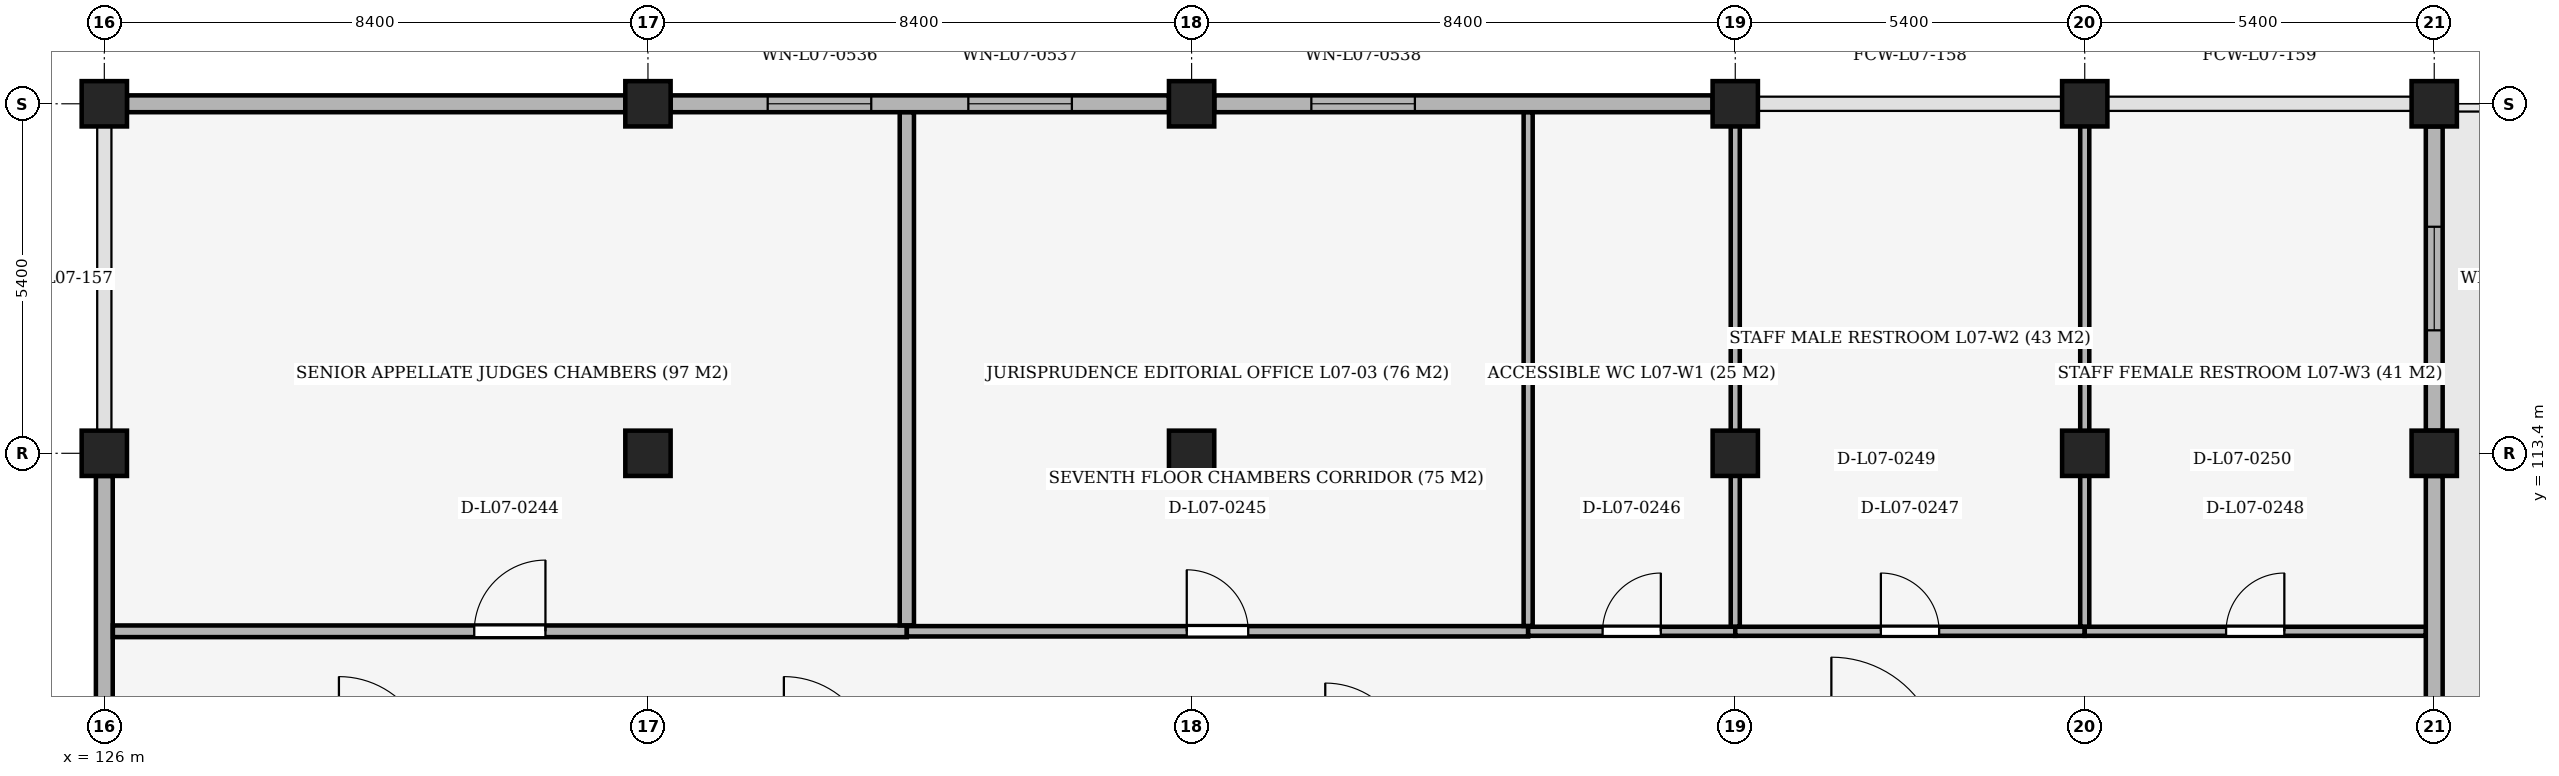
"""IFC4 building model, lengths in metres.
Left out: names, types, materials, properties, quantities, classifications, styles, units other than length and angle.
Written with IfcOpenShell. Run it as: python <this file> out.ifc"""

import sys

from ifc_helpers import new_model, si_unit, direction, frame, frame_2d, origin, origin_2d, place, context, subcontext, project, spatial, rectangle, extrude, element, fill, save


model = new_model("IFC4")
c1 = context("Model", 3, precision=1e-05, world=origin(), true_north=direction((0.0, 1.0)))
c2 = subcontext(c1, "Body", "Model", "MODEL_VIEW")
j1 = project(units=[si_unit("LENGTHUNIT", "METRE"), si_unit("PLANEANGLEUNIT", "RADIAN")], contexts=[c1])
p1 = place(None, origin())
s1 = spatial("IfcSite", under=j1, at=p1, CompositionType="ELEMENT")
p2 = place(p1, origin())
s2 = spatial("IfcBuilding", under=s1, at=p2, CompositionType="ELEMENT")
p3 = place(p2, frame((0.0, 0.0, 33.6)))
s3 = spatial("IfcBuildingStorey", under=s2, at=p3, CompositionType="ELEMENT", Elevation=33.6)
for number, where, z_axis, x_axis in (
    (1, (126.0, 113.4, 0.0), (0.0, 0.0, 1.0), (1.0, 0.0, 0.0)),
    (2, (126.0, 118.8, 0.0), (0.0, 0.0, 1.0), (1.0, 0.0, 0.0)),
    (3, (134.4, 113.4, 0.0), (0.0, 0.0, 1.0), (1.0, 0.0, 0.0)),
    (4, (134.4, 118.8, 0.0), (0.0, 0.0, 1.0), (1.0, 0.0, 0.0)),
    (5, (142.8, 113.4, 0.0), (0.0, 0.0, 1.0), (1.0, 0.0, 0.0)),
    (6, (142.8, 118.8, 0.0), (0.0, 0.0, 1.0), (1.0, 0.0, 0.0)),
    (7, (151.2, 113.4, 0.0), (0.0, 0.0, 1.0), (1.0, 0.0, 0.0)),
    (8, (151.2, 118.8, 0.0), (0.0, 0.0, 1.0), (1.0, 0.0, 0.0)),
    (9, (156.6, 113.4, 0.0), (0.0, 0.0, 1.0), (1.0, 0.0, 0.0)),
    (10, (156.6, 118.8, 0.0), (0.0, 0.0, 1.0), (1.0, 0.0, 0.0)),
    (11, (162.0, 113.4, 0.0), (0.0, 0.0, 1.0), (1.0, 0.0, 0.0)),
    (12, (162.0, 118.8, 0.0), (0.0, 0.0, 1.0), (1.0, 0.0, 0.0)),
):
    element("IfcColumn", number, at=place(p3, frame(where, z_axis=z_axis, x_axis=x_axis)), inside=s3, PredefinedType="COLUMN", context=c2, shape_type="SweptSolid", body=[
        extrude(rectangle(XDim=0.7, YDim=0.7, at=origin_2d()), origin(), (0.0, 0.0, 1.0), 4.2),
    ])
p4 = place(p3, frame((126.0, 108.35, 0.0), z_axis=(0.0, 0.0, 1.0), x_axis=(0.0, 1.0, 0.0)))
e13 = element("IfcWall", 13, at=p4, inside=s3, PredefinedType="SOLIDWALL", context=c2, shape_type="SweptSolid", body=[
    extrude(rectangle(XDim=4.7, YDim=0.26, at=frame_2d((2.35, 0.0))), origin(), (0.0, 0.0, 1.0), 3.4),
])
p5 = place(p3, frame((126.35, 118.8, 0.0), z_axis=(0.0, 0.0, 1.0), x_axis=(1.0, 0.0, 0.0)))
e14 = element("IfcWall", 14, at=p5, inside=s3, PredefinedType="SOLIDWALL", context=c2, shape_type="SweptSolid", body=[
    extrude(rectangle(XDim=7.7, YDim=0.26, at=frame_2d((3.85, 0.0))), origin(), (0.0, 0.0, 1.0), 3.25),
])
p6 = place(p3, frame((134.75, 118.8, 0.0), z_axis=(0.0, 0.0, 1.0), x_axis=(1.0, 0.0, 0.0)))
e15 = element("IfcWall", 15, at=p6, inside=s3, PredefinedType="SOLIDWALL", context=c2, shape_type="SweptSolid", body=[
    extrude(rectangle(XDim=7.7, YDim=0.26, at=frame_2d((3.85, 0.0))), origin(), (0.0, 0.0, 1.0), 3.25),
])
p7 = place(p6, frame((1.5, 0.0, 1.05)))
e16 = element("IfcOpeningElement", 16, at=p7, cuts=e15, PredefinedType="OPENING", context=c2, shape_type="SweptSolid", body=[
    extrude(rectangle(XDim=1.6, YDim=1.8, at=frame_2d((0.8, 0.9))), frame((0.0, 0.145, 0.0), z_axis=(0.0, -1.0, 0.0), x_axis=(1.0, 0.0, 0.0)), (0.0, 0.0, 1.0), 0.29),
])
p8 = place(p6, frame((4.6, 0.0, 1.05)))
e17 = element("IfcOpeningElement", 17, at=p8, cuts=e15, PredefinedType="OPENING", context=c2, shape_type="SweptSolid", body=[
    extrude(rectangle(XDim=1.6, YDim=1.8, at=frame_2d((0.8, 0.9))), frame((0.0, 0.145, 0.0), z_axis=(0.0, -1.0, 0.0), x_axis=(1.0, 0.0, 0.0)), (0.0, 0.0, 1.0), 0.29),
])
p9 = place(p3, frame((143.15, 118.8, 0.0), z_axis=(0.0, 0.0, 1.0), x_axis=(1.0, 0.0, 0.0)))
e18 = element("IfcWall", 18, at=p9, inside=s3, PredefinedType="SOLIDWALL", context=c2, shape_type="SweptSolid", body=[
    extrude(rectangle(XDim=7.7, YDim=0.26, at=frame_2d((3.85, 0.0))), origin(), (0.0, 0.0, 1.0), 3.25),
])
p10 = place(p9, frame((1.5, 0.0, 1.05)))
e19 = element("IfcOpeningElement", 19, at=p10, cuts=e18, PredefinedType="OPENING", context=c2, shape_type="SweptSolid", body=[
    extrude(rectangle(XDim=1.6, YDim=1.8, at=frame_2d((0.8, 0.9))), frame((0.0, 0.145, 0.0), z_axis=(0.0, -1.0, 0.0), x_axis=(1.0, 0.0, 0.0)), (0.0, 0.0, 1.0), 0.29),
])
p11 = place(p3, frame((162.0, 118.45, 0.0), z_axis=(0.0, 0.0, 1.0), x_axis=(0.0, -1.0, 0.0)))
e20 = element("IfcWall", 20, at=p11, inside=s3, PredefinedType="SOLIDWALL", context=c2, shape_type="SweptSolid", body=[
    extrude(rectangle(XDim=4.7, YDim=0.26, at=frame_2d((2.35, 0.0))), origin(), (0.0, 0.0, 1.0), 3.4),
])
p12 = place(p11, frame((1.55, 0.0, 1.05)))
e21 = element("IfcOpeningElement", 21, at=p12, cuts=e20, PredefinedType="OPENING", context=c2, shape_type="SweptSolid", body=[
    extrude(rectangle(XDim=1.6, YDim=1.8, at=frame_2d((0.8, 0.9))), frame((0.0, 0.145, 0.0), z_axis=(0.0, -1.0, 0.0), x_axis=(1.0, 0.0, 0.0)), (0.0, 0.0, 1.0), 0.29),
])
p13 = place(p3, frame((162.0, 113.05, 0.0), z_axis=(0.0, 0.0, 1.0), x_axis=(0.0, -1.0, 0.0)))
e22 = element("IfcWall", 22, at=p13, inside=s3, PredefinedType="SOLIDWALL", context=c2, shape_type="SweptSolid", body=[
    extrude(rectangle(XDim=4.7, YDim=0.26, at=frame_2d((2.35, 0.0))), origin(), (0.0, 0.0, 1.0), 3.4),
])
p14 = place(p3, frame((126.132, 110.65, 0.0), z_axis=(0.0, 0.0, 1.0), x_axis=(1.0, 0.0, 0.0)))
e23 = element("IfcWall", 23, at=p14, inside=s3, PredefinedType="PARTITIONING", context=c2, shape_type="SweptSolid", body=[
    extrude(rectangle(XDim=12.268, YDim=0.18, at=frame_2d((6.134, 0.0))), origin(), (0.0, 0.0, 1.0), 3.4),
])
p15 = place(p14, frame((5.584, 0.0, 0.0)))
e24 = element("IfcOpeningElement", 24, at=p15, cuts=e23, PredefinedType="OPENING", context=c2, shape_type="SweptSolid", body=[
    extrude(rectangle(XDim=1.1, YDim=2.2, at=frame_2d((0.55, 1.1))), frame((0.0, 0.105, 0.0), z_axis=(0.0, -1.0, 0.0), x_axis=(1.0, 0.0, 0.0)), (0.0, 0.0, 1.0), 0.21),
])
p16 = place(p3, frame((138.4, 110.65, 0.0), z_axis=(0.0, 0.0, 1.0), x_axis=(1.0, 0.0, 0.0)))
e25 = element("IfcWall", 25, at=p16, inside=s3, PredefinedType="PARTITIONING", context=c2, shape_type="SweptSolid", body=[
    extrude(rectangle(XDim=9.6, YDim=0.16, at=frame_2d((4.8, 0.0))), origin(), (0.0, 0.0, 1.0), 3.4),
])
p17 = place(p16, frame((4.325, 0.0, 0.0)))
e26 = element("IfcOpeningElement", 26, at=p17, cuts=e25, PredefinedType="OPENING", context=c2, shape_type="SweptSolid", body=[
    extrude(rectangle(XDim=0.95, YDim=2.1, at=frame_2d((0.475, 1.05))), frame((0.0, 0.095, 0.0), z_axis=(0.0, -1.0, 0.0), x_axis=(1.0, 0.0, 0.0)), (0.0, 0.0, 1.0), 0.19),
])
p18 = place(p3, frame((148.0, 110.65, 0.0), z_axis=(0.0, 0.0, 1.0), x_axis=(1.0, 0.0, 0.0)))
e27 = element("IfcWall", 27, at=p18, inside=s3, PredefinedType="PARTITIONING", context=c2, shape_type="SweptSolid", body=[
    extrude(rectangle(XDim=3.2, YDim=0.14, at=frame_2d((1.6, 0.0))), origin(), (0.0, 0.0, 1.0), 3.4),
])
p19 = place(p18, frame((1.15, 0.0, 0.0)))
e28 = element("IfcOpeningElement", 28, at=p19, cuts=e27, PredefinedType="OPENING", context=c2, shape_type="SweptSolid", body=[
    extrude(rectangle(XDim=0.9, YDim=2.1, at=frame_2d((0.45, 1.05))), frame((0.0, 0.085, 0.0), z_axis=(0.0, -1.0, 0.0), x_axis=(1.0, 0.0, 0.0)), (0.0, 0.0, 1.0), 0.17),
])
p20 = place(p3, frame((151.2, 110.65, 0.0), z_axis=(0.0, 0.0, 1.0), x_axis=(1.0, 0.0, 0.0)))
e29 = element("IfcWall", 29, at=p20, inside=s3, PredefinedType="PARTITIONING", context=c2, shape_type="SweptSolid", body=[
    extrude(rectangle(XDim=5.4, YDim=0.14, at=frame_2d((2.7, 0.0))), origin(), (0.0, 0.0, 1.0), 3.4),
])
p21 = place(p20, frame((2.25, 0.0, 0.0)))
e30 = element("IfcOpeningElement", 30, at=p21, cuts=e29, PredefinedType="OPENING", context=c2, shape_type="SweptSolid", body=[
    extrude(rectangle(XDim=0.9, YDim=2.1, at=frame_2d((0.45, 1.05))), frame((0.0, 0.085, 0.0), z_axis=(0.0, -1.0, 0.0), x_axis=(1.0, 0.0, 0.0)), (0.0, 0.0, 1.0), 0.17),
])
p22 = place(p3, frame((156.6, 110.65, 0.0), z_axis=(0.0, 0.0, 1.0), x_axis=(1.0, 0.0, 0.0)))
e31 = element("IfcWall", 31, at=p22, inside=s3, PredefinedType="PARTITIONING", context=c2, shape_type="SweptSolid", body=[
    extrude(rectangle(XDim=5.268, YDim=0.14, at=frame_2d((2.634, 0.0))), origin(), (0.0, 0.0, 1.0), 3.4),
])
p23 = place(p22, frame((2.184, 0.0, 0.0)))
e32 = element("IfcOpeningElement", 32, at=p23, cuts=e31, PredefinedType="OPENING", context=c2, shape_type="SweptSolid", body=[
    extrude(rectangle(XDim=0.9, YDim=2.1, at=frame_2d((0.45, 1.05))), frame((0.0, 0.085, 0.0), z_axis=(0.0, -1.0, 0.0), x_axis=(1.0, 0.0, 0.0)), (0.0, 0.0, 1.0), 0.17),
])
p24 = place(p3, frame((138.4, 110.742, 0.0), z_axis=(0.0, 0.0, 1.0), x_axis=(0.0, 1.0, 0.0)))
e33 = element("IfcWall", 33, at=p24, inside=s3, PredefinedType="PARTITIONING", context=c2, shape_type="SweptSolid", body=[
    extrude(rectangle(XDim=7.926, YDim=0.22, at=frame_2d((3.963, 0.0))), origin(), (0.0, 0.0, 1.0), 3.25),
])
p25 = place(p3, frame((148.0, 110.732, 0.0), z_axis=(0.0, 0.0, 1.0), x_axis=(0.0, 1.0, 0.0)))
e34 = element("IfcWall", 34, at=p25, inside=s3, PredefinedType="PARTITIONING", context=c2, shape_type="SweptSolid", body=[
    extrude(rectangle(XDim=7.936, YDim=0.14, at=frame_2d((3.968, 0.0))), origin(), (0.0, 0.0, 1.0), 3.25),
])
p26 = place(p3, frame((151.2, 110.722, 0.0), z_axis=(0.0, 0.0, 1.0), x_axis=(0.0, 1.0, 0.0)))
e35 = element("IfcWall", 35, at=p26, inside=s3, PredefinedType="PARTITIONING", context=c2, shape_type="SweptSolid", body=[
    extrude(rectangle(XDim=8.156, YDim=0.14, at=frame_2d((4.078, 0.0))), origin(), (0.0, 0.0, 1.0), 3.4),
])
p27 = place(p3, frame((156.6, 110.722, 0.0), z_axis=(0.0, 0.0, 1.0), x_axis=(0.0, 1.0, 0.0)))
e36 = element("IfcWall", 36, at=p27, inside=s3, PredefinedType="PARTITIONING", context=c2, shape_type="SweptSolid", body=[
    extrude(rectangle(XDim=8.176, YDim=0.14, at=frame_2d((4.088, 0.0))), origin(), (0.0, 0.0, 1.0), 3.4),
])
p28 = place(p7, origin())
e37 = element("IfcWindow", 37, at=p28, inside=s3, PartitioningType="SINGLE_PANEL", PredefinedType="WINDOW", context=c2, shape_type="SweptSolid", body=[
    extrude(rectangle(XDim=1.6, YDim=1.8, at=frame_2d((0.8, 0.9))), frame((0.0, 0.03, 0.0), z_axis=(0.0, -1.0, 0.0), x_axis=(1.0, 0.0, 0.0)), (0.0, 0.0, 1.0), 0.06),
])
fill(e16, e37)
p29 = place(p8, origin())
e38 = element("IfcWindow", 38, at=p29, inside=s3, PartitioningType="SINGLE_PANEL", PredefinedType="WINDOW", context=c2, shape_type="SweptSolid", body=[
    extrude(rectangle(XDim=1.6, YDim=1.8, at=frame_2d((0.8, 0.9))), frame((0.0, 0.03, 0.0), z_axis=(0.0, -1.0, 0.0), x_axis=(1.0, 0.0, 0.0)), (0.0, 0.0, 1.0), 0.06),
])
fill(e17, e38)
p30 = place(p10, origin())
e39 = element("IfcWindow", 39, at=p30, inside=s3, PartitioningType="SINGLE_PANEL", PredefinedType="WINDOW", context=c2, shape_type="SweptSolid", body=[
    extrude(rectangle(XDim=1.6, YDim=1.8, at=frame_2d((0.8, 0.9))), frame((0.0, 0.03, 0.0), z_axis=(0.0, -1.0, 0.0), x_axis=(1.0, 0.0, 0.0)), (0.0, 0.0, 1.0), 0.06),
])
fill(e19, e39)
p31 = place(p12, origin())
e40 = element("IfcWindow", 40, at=p31, inside=s3, PartitioningType="SINGLE_PANEL", PredefinedType="WINDOW", context=c2, shape_type="SweptSolid", body=[
    extrude(rectangle(XDim=1.6, YDim=1.8, at=frame_2d((0.8, 0.9))), frame((0.0, 0.03, 0.0), z_axis=(0.0, -1.0, 0.0), x_axis=(1.0, 0.0, 0.0)), (0.0, 0.0, 1.0), 0.06),
])
fill(e21, e40)
p32 = place(p15, origin())
e41 = element("IfcDoor", 41, at=p32, inside=s3, OperationType="SINGLE_SWING_RIGHT", PredefinedType="DOOR", context=c2, shape_type="SweptSolid", body=[
    extrude(rectangle(XDim=1.1, YDim=2.2, at=frame_2d((0.55, 1.1))), frame((0.0, 0.025, 0.0), z_axis=(0.0, -1.0, 0.0), x_axis=(1.0, 0.0, 0.0)), (0.0, 0.0, 1.0), 0.05),
])
fill(e24, e41)
p33 = place(p17, origin())
e42 = element("IfcDoor", 42, at=p33, inside=s3, OperationType="SINGLE_SWING_LEFT", PredefinedType="DOOR", context=c2, shape_type="SweptSolid", body=[
    extrude(rectangle(XDim=0.95, YDim=2.1, at=frame_2d((0.475, 1.05))), frame((0.0, 0.025, 0.0), z_axis=(0.0, -1.0, 0.0), x_axis=(1.0, 0.0, 0.0)), (0.0, 0.0, 1.0), 0.05),
])
fill(e26, e42)
p34 = place(p19, origin())
e43 = element("IfcDoor", 43, at=p34, inside=s3, OperationType="SINGLE_SWING_RIGHT", PredefinedType="DOOR", context=c2, shape_type="SweptSolid", body=[
    extrude(rectangle(XDim=0.9, YDim=2.1, at=frame_2d((0.45, 1.05))), frame((0.0, 0.025, 0.0), z_axis=(0.0, -1.0, 0.0), x_axis=(1.0, 0.0, 0.0)), (0.0, 0.0, 1.0), 0.05),
])
fill(e28, e43)
p35 = place(p21, origin())
e44 = element("IfcDoor", 44, at=p35, inside=s3, OperationType="SINGLE_SWING_LEFT", PredefinedType="DOOR", context=c2, shape_type="SweptSolid", body=[
    extrude(rectangle(XDim=0.9, YDim=2.1, at=frame_2d((0.45, 1.05))), frame((0.0, 0.025, 0.0), z_axis=(0.0, -1.0, 0.0), x_axis=(1.0, 0.0, 0.0)), (0.0, 0.0, 1.0), 0.05),
])
fill(e30, e44)
p36 = place(p23, origin())
e45 = element("IfcDoor", 45, at=p36, inside=s3, OperationType="SINGLE_SWING_RIGHT", PredefinedType="DOOR", context=c2, shape_type="SweptSolid", body=[
    extrude(rectangle(XDim=0.9, YDim=2.1, at=frame_2d((0.45, 1.05))), frame((0.0, 0.025, 0.0), z_axis=(0.0, -1.0, 0.0), x_axis=(1.0, 0.0, 0.0)), (0.0, 0.0, 1.0), 0.05),
])
fill(e32, e45)
save(model, sys.argv[1])
